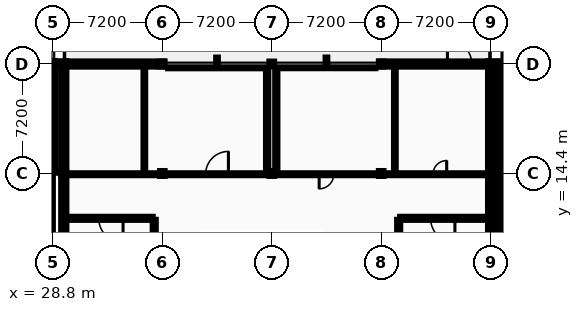
"""IFC4 building model, lengths in metres.
Left out: names, types, materials, properties, quantities, classifications, styles, units other than length and angle.
Written with IfcOpenShell. Run it as: python <this file> out.ifc"""

import sys

from ifc_helpers import new_model, si_unit, direction, frame, frame_2d, origin, origin_2d, place, context, subcontext, project, spatial, rectangle, i_section, extrude, element, fill, save


model = new_model("IFC4")
c1 = context("Model", 3, precision=1e-05, world=origin(), true_north=direction((0.0, 1.0)))
c2 = subcontext(c1, "Body", "Model", "MODEL_VIEW")
j1 = project(units=[si_unit("LENGTHUNIT", "METRE"), si_unit("PLANEANGLEUNIT", "RADIAN")], contexts=[c1])
p1 = place(None, origin())
s1 = spatial("IfcSite", under=j1, at=p1, CompositionType="ELEMENT")
p2 = place(p1, origin())
s2 = spatial("IfcBuilding", under=s1, at=p2, CompositionType="ELEMENT")
p3 = place(p2, frame((0.0, 0.0, 14.0)))
s3 = spatial("IfcBuildingStorey", under=s2, at=p3, CompositionType="ELEMENT", Elevation=14.0)
p4 = place(p3, frame((28.8, 21.6, 0.0), z_axis=(0.0, 0.0, 1.0), x_axis=(1.0, 0.0, 0.0)))
e1 = element("IfcColumn", 1, at=p4, inside=s3, PredefinedType="COLUMN", context=c2, shape_type="SweptSolid", body=[
    extrude(i_section(OverallWidth=0.3, OverallDepth=0.4, WebThickness=0.013, FlangeThickness=0.024, FilletRadius=0.027, at=origin_2d()), origin(), (0.0, 0.0, 1.0), 4.4),
])
for number, where, z_axis, x_axis in (
    (2, (29.52, 14.4, 0.0), (0.0, 0.0, 1.0), (1.0, 0.0, 0.0)),
    (3, (29.52, 21.6, 0.0), (0.0, 0.0, 1.0), (1.0, 0.0, 0.0)),
    (4, (36.0, 14.4, 0.0), (0.0, 0.0, 1.0), (1.0, 0.0, 0.0)),
    (5, (36.0, 21.6, 0.0), (0.0, 0.0, 1.0), (1.0, 0.0, 0.0)),
    (6, (43.2, 14.4, 0.0), (0.0, 0.0, 1.0), (1.0, 0.0, 0.0)),
    (7, (43.2, 21.6, 0.0), (0.0, 0.0, 1.0), (1.0, 0.0, 0.0)),
    (8, (50.4, 14.4, 0.0), (0.0, 0.0, 1.0), (1.0, 0.0, 0.0)),
    (9, (50.4, 21.6, 0.0), (0.0, 0.0, 1.0), (1.0, 0.0, 0.0)),
    (10, (57.6, 14.4, 0.0), (0.0, 0.0, 1.0), (1.0, 0.0, 0.0)),
    (11, (57.6, 21.6, 0.0), (0.0, 0.0, 1.0), (1.0, 0.0, 0.0)),
    (12, (58.32, 14.4, 0.0), (0.0, 0.0, 1.0), (1.0, 0.0, 0.0)),
    (13, (58.32, 21.6, 0.0), (0.0, 0.0, 1.0), (1.0, 0.0, 0.0)),
):
    element("IfcColumn", number, at=place(p3, frame(where, z_axis=z_axis, x_axis=x_axis)), inside=s3, PredefinedType="COLUMN", context=c2, shape_type="SweptSolid", body=[
        extrude(i_section(OverallWidth=0.3, OverallDepth=0.32, WebThickness=0.011, FlangeThickness=0.021, FilletRadius=0.027, at=origin_2d()), origin(), (0.0, 0.0, 1.0), 4.4),
    ])
p5 = place(p3, frame((28.8, 14.45, 0.0), z_axis=(0.0, 0.0, 1.0), x_axis=(0.0, 1.0, 0.0)))
e14 = element("IfcWall", 14, at=p5, inside=s3, PredefinedType="STANDARD", context=c2, shape_type="SweptSolid", body=[
    extrude(rectangle(XDim=7.15, YDim=0.34, at=frame_2d((3.575, 0.0))), origin(), (0.0, 0.0, 1.0), 4.2),
])
p6 = place(p5, frame((1.596, 0.0, 0.95)))
e15 = element("IfcOpeningElement", 15, at=p6, cuts=e14, PredefinedType="OPENING", context=c2, shape_type="SweptSolid", body=[
    extrude(rectangle(XDim=1.098, YDim=1.368, at=frame_2d((0.549, 0.684))), frame((0.0, 0.18, 0.0), z_axis=(0.0, -1.0, 0.0), x_axis=(1.0, 0.0, 0.0)), (0.0, 0.0, 1.0), 0.36),
])
p7 = place(p5, frame((4.456, 0.0, 0.95)))
e16 = element("IfcOpeningElement", 16, at=p7, cuts=e14, PredefinedType="OPENING", context=c2, shape_type="SweptSolid", body=[
    extrude(rectangle(XDim=1.098, YDim=1.368, at=frame_2d((0.549, 0.684))), frame((0.0, 0.18, 0.0), z_axis=(0.0, -1.0, 0.0), x_axis=(1.0, 0.0, 0.0)), (0.0, 0.0, 1.0), 0.36),
])
p8 = place(p3, frame((36.11, 21.6, 0.0), z_axis=(0.0, 0.0, 1.0), x_axis=(-1.0, 0.0, 0.0)))
e17 = element("IfcWall", 17, at=p8, inside=s3, PredefinedType="STANDARD", context=c2, shape_type="SweptSolid", body=[
    extrude(rectangle(XDim=6.42, YDim=0.34, at=frame_2d((3.21, 0.0))), origin(), (0.0, 0.0, 1.0), 3.935),
])
p9 = place(p3, frame((57.43, 21.6, 0.0), z_axis=(0.0, 0.0, 1.0), x_axis=(-1.0, 0.0, 0.0)))
e18 = element("IfcWall", 18, at=p9, inside=s3, PredefinedType="STANDARD", context=c2, shape_type="SweptSolid", body=[
    extrude(rectangle(XDim=7.14, YDim=0.34, at=frame_2d((3.57, 0.0))), origin(), (0.0, 0.0, 1.0), 3.935),
])
p10 = place(p9, frame((1.072, 0.0, 0.0)))
e19 = element("IfcOpeningElement", 19, at=p10, cuts=e18, PredefinedType="OPENING", context=c2, shape_type="SweptSolid", body=[
    extrude(rectangle(XDim=1.6, YDim=2.2, at=frame_2d((0.8, 1.1))), frame((0.0, 0.18, 0.0), z_axis=(0.0, -1.0, 0.0), x_axis=(1.0, 0.0, 0.0)), (0.0, 0.0, 1.0), 0.36),
])
p11 = place(p3, frame((29.52, 14.4, 0.0), z_axis=(0.0, 0.0, 1.0), x_axis=(0.0, -1.0, 0.0)))
e20 = element("IfcWall", 20, at=p11, inside=s3, PredefinedType="STANDARD", context=c2, shape_type="SweptSolid", body=[
    extrude(rectangle(XDim=5.5, YDim=0.34, at=frame_2d((2.75, 0.0))), origin(), (0.0, 0.0, 1.0), 4.2),
])
p12 = place(p3, frame((29.52, 21.77, 0.0), z_axis=(0.0, 0.0, 1.0), x_axis=(0.0, -1.0, 0.0)))
e21 = element("IfcWall", 21, at=p12, inside=s3, PredefinedType="STANDARD", context=c2, shape_type="SweptSolid", body=[
    extrude(rectangle(XDim=7.37, YDim=0.34, at=frame_2d((3.685, 0.0))), origin(), (0.0, 0.0, 1.0), 3.895),
])
p13 = place(p12, frame((1.73, 0.0, 0.95)))
e22 = element("IfcOpeningElement", 22, at=p13, cuts=e21, PredefinedType="OPENING", context=c2, shape_type="SweptSolid", body=[
    extrude(rectangle(XDim=0.962, YDim=1.404, at=frame_2d((0.481, 0.702))), frame((0.0, 0.18, 0.0), z_axis=(0.0, -1.0, 0.0), x_axis=(1.0, 0.0, 0.0)), (0.0, 0.0, 1.0), 0.36),
])
p14 = place(p12, frame((4.678, 0.0, 0.95)))
e23 = element("IfcOpeningElement", 23, at=p14, cuts=e21, PredefinedType="OPENING", context=c2, shape_type="SweptSolid", body=[
    extrude(rectangle(XDim=0.962, YDim=1.404, at=frame_2d((0.481, 0.702))), frame((0.0, 0.18, 0.0), z_axis=(0.0, -1.0, 0.0), x_axis=(1.0, 0.0, 0.0)), (0.0, 0.0, 1.0), 0.36),
])
p15 = place(p3, frame((57.6, 8.9, 0.0), z_axis=(0.0, 0.0, 1.0), x_axis=(0.0, 1.0, 0.0)))
e24 = element("IfcWall", 24, at=p15, inside=s3, PredefinedType="STANDARD", context=c2, shape_type="SweptSolid", body=[
    extrude(rectangle(XDim=5.5, YDim=0.34, at=frame_2d((2.75, 0.0))), origin(), (0.0, 0.0, 1.0), 4.2),
])
p16 = place(p3, frame((57.6, 14.4, 0.0), z_axis=(0.0, 0.0, 1.0), x_axis=(0.0, 1.0, 0.0)))
e25 = element("IfcWall", 25, at=p16, inside=s3, PredefinedType="STANDARD", context=c2, shape_type="SweptSolid", body=[
    extrude(rectangle(XDim=7.37, YDim=0.34, at=frame_2d((3.685, 0.0))), origin(), (0.0, 0.0, 1.0), 3.895),
])
p17 = place(p16, frame((1.679, 0.0, 0.95)))
e26 = element("IfcOpeningElement", 26, at=p17, cuts=e25, PredefinedType="OPENING", context=c2, shape_type="SweptSolid", body=[
    extrude(rectangle(XDim=1.064, YDim=1.404, at=frame_2d((0.532, 0.702))), frame((0.0, 0.18, 0.0), z_axis=(0.0, -1.0, 0.0), x_axis=(1.0, 0.0, 0.0)), (0.0, 0.0, 1.0), 0.36),
])
p18 = place(p16, frame((4.627, 0.0, 0.95)))
e27 = element("IfcOpeningElement", 27, at=p18, cuts=e25, PredefinedType="OPENING", context=c2, shape_type="SweptSolid", body=[
    extrude(rectangle(XDim=1.064, YDim=1.404, at=frame_2d((0.532, 0.702))), frame((0.0, 0.18, 0.0), z_axis=(0.0, -1.0, 0.0), x_axis=(1.0, 0.0, 0.0)), (0.0, 0.0, 1.0), 0.36),
])
p19 = place(p3, frame((58.32, 14.4, 0.0), z_axis=(0.0, 0.0, 1.0), x_axis=(0.0, -1.0, 0.0)))
e28 = element("IfcWall", 28, at=p19, inside=s3, PredefinedType="STANDARD", context=c2, shape_type="SweptSolid", body=[
    extrude(rectangle(XDim=5.5, YDim=0.34, at=frame_2d((2.75, 0.0))), origin(), (0.0, 0.0, 1.0), 4.2),
])
p20 = place(p3, frame((58.32, 21.77, 0.0), z_axis=(0.0, 0.0, 1.0), x_axis=(0.0, -1.0, 0.0)))
e29 = element("IfcWall", 29, at=p20, inside=s3, PredefinedType="STANDARD", context=c2, shape_type="SweptSolid", body=[
    extrude(rectangle(XDim=7.37, YDim=0.34, at=frame_2d((3.685, 0.0))), origin(), (0.0, 0.0, 1.0), 3.895),
])
p21 = place(p20, frame((1.764, 0.0, 0.95)))
e30 = element("IfcOpeningElement", 30, at=p21, cuts=e29, PredefinedType="OPENING", context=c2, shape_type="SweptSolid", body=[
    extrude(rectangle(XDim=0.894, YDim=1.368, at=frame_2d((0.447, 0.684))), frame((0.0, 0.18, 0.0), z_axis=(0.0, -1.0, 0.0), x_axis=(1.0, 0.0, 0.0)), (0.0, 0.0, 1.0), 0.36),
])
p22 = place(p20, frame((4.712, 0.0, 0.95)))
e31 = element("IfcOpeningElement", 31, at=p22, cuts=e29, PredefinedType="OPENING", context=c2, shape_type="SweptSolid", body=[
    extrude(rectangle(XDim=0.894, YDim=1.368, at=frame_2d((0.447, 0.684))), frame((0.0, 0.18, 0.0), z_axis=(0.0, -1.0, 0.0), x_axis=(1.0, 0.0, 0.0)), (0.0, 0.0, 1.0), 0.36),
])
p23 = place(p3, frame((28.6, 5.85, 0.0), z_axis=(0.0, 0.0, 1.0), x_axis=(0.0, 1.0, 0.0)))
e32 = element("IfcWall", 32, at=p23, inside=s3, PredefinedType="SHEAR", context=c2, shape_type="SweptSolid", body=[
    extrude(rectangle(XDim=8.6, YDim=0.4, at=frame_2d((4.3, 0.0))), origin(), (0.0, 0.0, 1.0), 4.2),
])
p24 = place(p3, frame((29.87, 11.45, 0.0), z_axis=(0.0, 0.0, 1.0), x_axis=(1.0, 0.0, 0.0)))
e33 = element("IfcWall", 33, at=p24, inside=s3, PredefinedType="PARTITIONING", context=c2, shape_type="SweptSolid", body=[
    extrude(rectangle(XDim=5.5, YDim=0.2, at=frame_2d((2.75, 0.0))), origin(), (0.0, 0.0, 1.0), 4.2),
])
p25 = place(p24, frame((1.95, 0.0, 0.0)))
e34 = element("IfcOpeningElement", 34, at=p25, cuts=e33, PredefinedType="OPENING", context=c2, shape_type="SweptSolid", body=[
    extrude(rectangle(XDim=1.6, YDim=2.2, at=frame_2d((0.8, 1.1))), frame((0.0, 0.11, 0.0), z_axis=(0.0, -1.0, 0.0), x_axis=(1.0, 0.0, 0.0)), (0.0, 0.0, 1.0), 0.22),
])
p26 = place(p3, frame((35.47, 8.9, 0.0), z_axis=(0.0, 0.0, 1.0), x_axis=(0.0, 1.0, 0.0)))
e35 = element("IfcWall", 35, at=p26, inside=s3, PredefinedType="PARTITIONING", context=c2, shape_type="SweptSolid", body=[
    extrude(rectangle(XDim=2.45, YDim=0.2, at=frame_2d((1.225, 0.0))), origin(), (0.0, 0.0, 1.0), 4.2),
])
p27 = place(p3, frame((51.65, 11.45, 0.0), z_axis=(0.0, 0.0, 1.0), x_axis=(1.0, 0.0, 0.0)))
e36 = element("IfcWall", 36, at=p27, inside=s3, PredefinedType="PARTITIONING", context=c2, shape_type="SweptSolid", body=[
    extrude(rectangle(XDim=5.6, YDim=0.2, at=frame_2d((2.8, 0.0))), origin(), (0.0, 0.0, 1.0), 4.2),
])
p28 = place(p27, frame((2.0, 0.0, 0.0)))
e37 = element("IfcOpeningElement", 37, at=p28, cuts=e36, PredefinedType="OPENING", context=c2, shape_type="SweptSolid", body=[
    extrude(rectangle(XDim=1.6, YDim=2.2, at=frame_2d((0.8, 1.1))), frame((0.0, 0.11, 0.0), z_axis=(0.0, -1.0, 0.0), x_axis=(1.0, 0.0, 0.0)), (0.0, 0.0, 1.0), 0.22),
])
p29 = place(p3, frame((51.55, 8.9, 0.0), z_axis=(0.0, 0.0, 1.0), x_axis=(0.0, 1.0, 0.0)))
e38 = element("IfcWall", 38, at=p29, inside=s3, PredefinedType="PARTITIONING", context=c2, shape_type="SweptSolid", body=[
    extrude(rectangle(XDim=2.45, YDim=0.2, at=frame_2d((1.225, 0.0))), origin(), (0.0, 0.0, 1.0), 4.2),
])
p30 = place(p3, frame((29.9, 14.35, 0.0), z_axis=(0.0, 0.0, 1.0), x_axis=(1.0, 0.0, 0.0)))
e39 = element("IfcWall", 39, at=p30, inside=s3, PredefinedType="PARTITIONING", context=c2, shape_type="SweptSolid", body=[
    extrude(rectangle(XDim=5.72, YDim=0.125, at=frame_2d((2.86, 0.0))), origin(), (0.0, 0.0, 1.0), 3.935),
])
p31 = place(p30, frame((1.96, 0.0, 0.0)))
e40 = element("IfcOpeningElement", 40, at=p31, cuts=e39, PredefinedType="OPENING", context=c2, shape_type="SweptSolid", body=[
    extrude(rectangle(XDim=1.0, YDim=2.1, at=frame_2d((0.5, 1.05))), frame((0.0, 0.073, 0.0), z_axis=(0.0, -1.0, 0.0), x_axis=(1.0, 0.0, 0.0)), (0.0, 0.0, 1.0), 0.145),
])
p32 = place(p3, frame((36.38, 14.35, 0.0), z_axis=(0.0, 0.0, 1.0), x_axis=(1.0, 0.0, 0.0)))
e41 = element("IfcWall", 41, at=p32, inside=s3, PredefinedType="PARTITIONING", context=c2, shape_type="SweptSolid", body=[
    extrude(rectangle(XDim=6.44, YDim=0.125, at=frame_2d((3.22, 0.0))), origin(), (0.0, 0.0, 1.0), 3.935),
])
p33 = place(p32, frame((2.47, 0.0, 0.0)))
e42 = element("IfcOpeningElement", 42, at=p33, cuts=e41, PredefinedType="OPENING", context=c2, shape_type="SweptSolid", body=[
    extrude(rectangle(XDim=1.5, YDim=2.2, at=frame_2d((0.75, 1.1))), frame((0.0, 0.073, 0.0), z_axis=(0.0, -1.0, 0.0), x_axis=(1.0, 0.0, 0.0)), (0.0, 0.0, 1.0), 0.145),
])
p34 = place(p3, frame((43.58, 14.35, 0.0), z_axis=(0.0, 0.0, 1.0), x_axis=(1.0, 0.0, 0.0)))
e43 = element("IfcWall", 43, at=p34, inside=s3, PredefinedType="PARTITIONING", context=c2, shape_type="SweptSolid", body=[
    extrude(rectangle(XDim=6.44, YDim=0.125, at=frame_2d((3.22, 0.0))), origin(), (0.0, 0.0, 1.0), 3.935),
])
p35 = place(p34, frame((2.741, 0.0, 0.0)))
e44 = element("IfcOpeningElement", 44, at=p35, cuts=e43, PredefinedType="OPENING", context=c2, shape_type="SweptSolid", body=[
    extrude(rectangle(XDim=0.958, YDim=2.04, at=frame_2d((0.479, 1.02))), frame((0.0, 0.073, 0.0), z_axis=(0.0, -1.0, 0.0), x_axis=(1.0, 0.0, 0.0)), (0.0, 0.0, 1.0), 0.145),
])
p36 = place(p3, frame((50.78, 14.35, 0.0), z_axis=(0.0, 0.0, 1.0), x_axis=(1.0, 0.0, 0.0)))
e45 = element("IfcWall", 45, at=p36, inside=s3, PredefinedType="PARTITIONING", context=c2, shape_type="SweptSolid", body=[
    extrude(rectangle(XDim=6.44, YDim=0.125, at=frame_2d((3.22, 0.0))), origin(), (0.0, 0.0, 1.0), 3.935),
])
p37 = place(p36, frame((3.03, 0.0, 0.0)))
e46 = element("IfcOpeningElement", 46, at=p37, cuts=e45, PredefinedType="OPENING", context=c2, shape_type="SweptSolid", body=[
    extrude(rectangle(XDim=0.9, YDim=2.1, at=frame_2d((0.45, 1.05))), frame((0.0, 0.073, 0.0), z_axis=(0.0, -1.0, 0.0), x_axis=(1.0, 0.0, 0.0)), (0.0, 0.0, 1.0), 0.145),
])
p38 = place(p3, frame((36.38, 21.4, 0.0), z_axis=(0.0, 0.0, 1.0), x_axis=(1.0, 0.0, 0.0)))
e47 = element("IfcWall", 47, at=p38, inside=s3, PredefinedType="PARTITIONING", context=c2, shape_type="SweptSolid", body=[
    extrude(rectangle(XDim=6.44, YDim=0.16, at=frame_2d((3.22, 0.0))), origin(), (0.0, 0.0, 1.0), 3.935),
])
p39 = place(p3, frame((43.58, 21.4, 0.0), z_axis=(0.0, 0.0, 1.0), x_axis=(1.0, 0.0, 0.0)))
e48 = element("IfcWall", 48, at=p39, inside=s3, PredefinedType="PARTITIONING", context=c2, shape_type="SweptSolid", body=[
    extrude(rectangle(XDim=6.44, YDim=0.15, at=frame_2d((3.22, 0.0))), origin(), (0.0, 0.0, 1.0), 3.935),
])
p40 = place(p3, frame((34.82, 14.413, 0.0), z_axis=(0.0, 0.0, 1.0), x_axis=(0.0, 1.0, 0.0)))
e49 = element("IfcWall", 49, at=p40, inside=s3, PredefinedType="PARTITIONING", context=c2, shape_type="SweptSolid", body=[
    extrude(rectangle(XDim=6.987, YDim=0.11, at=frame_2d((3.494, 0.0))), origin(), (0.0, 0.0, 1.0), 4.2),
])
p41 = place(p3, frame((42.9, 14.78, 0.0), z_axis=(0.0, 0.0, 1.0), x_axis=(0.0, 1.0, 0.0)))
e50 = element("IfcWall", 50, at=p41, inside=s3, PredefinedType="PARTITIONING", context=c2, shape_type="SweptSolid", body=[
    extrude(rectangle(XDim=6.44, YDim=0.15, at=frame_2d((3.22, 0.0))), origin(), (0.0, 0.0, 1.0), 3.895),
])
p42 = place(p3, frame((43.5, 14.78, 0.0), z_axis=(0.0, 0.0, 1.0), x_axis=(0.0, 1.0, 0.0)))
e51 = element("IfcWall", 51, at=p42, inside=s3, PredefinedType="PARTITIONING", context=c2, shape_type="SweptSolid", body=[
    extrude(rectangle(XDim=6.44, YDim=0.142, at=frame_2d((3.22, 0.0))), origin(), (0.0, 0.0, 1.0), 3.895),
])
p43 = place(p3, frame((51.3, 14.413, 0.0), z_axis=(0.0, 0.0, 1.0), x_axis=(0.0, 1.0, 0.0)))
e52 = element("IfcWall", 52, at=p43, inside=s3, PredefinedType="PARTITIONING", context=c2, shape_type="SweptSolid", body=[
    extrude(rectangle(XDim=6.987, YDim=0.11, at=frame_2d((3.494, 0.0))), origin(), (0.0, 0.0, 1.0), 4.2),
])
p44 = place(p6, origin())
e53 = element("IfcWindow", 53, at=p44, inside=s3, PartitioningType="SINGLE_PANEL", PredefinedType="WINDOW", context=c2, shape_type="SweptSolid", body=[
    extrude(rectangle(XDim=1.098, YDim=1.368, at=frame_2d((0.549, 0.684))), frame((0.0, 0.03, 0.0), z_axis=(0.0, -1.0, 0.0), x_axis=(1.0, 0.0, 0.0)), (0.0, 0.0, 1.0), 0.06),
])
fill(e15, e53)
p45 = place(p7, origin())
e54 = element("IfcWindow", 54, at=p45, inside=s3, PartitioningType="SINGLE_PANEL", PredefinedType="WINDOW", context=c2, shape_type="SweptSolid", body=[
    extrude(rectangle(XDim=1.098, YDim=1.368, at=frame_2d((0.549, 0.684))), frame((0.0, 0.03, 0.0), z_axis=(0.0, -1.0, 0.0), x_axis=(1.0, 0.0, 0.0)), (0.0, 0.0, 1.0), 0.06),
])
fill(e16, e54)
p46 = place(p13, origin())
e55 = element("IfcWindow", 55, at=p46, inside=s3, PartitioningType="SINGLE_PANEL", PredefinedType="WINDOW", context=c2, shape_type="SweptSolid", body=[
    extrude(rectangle(XDim=0.962, YDim=1.404, at=frame_2d((0.481, 0.702))), frame((0.0, 0.03, 0.0), z_axis=(0.0, -1.0, 0.0), x_axis=(1.0, 0.0, 0.0)), (0.0, 0.0, 1.0), 0.06),
])
fill(e22, e55)
p47 = place(p14, origin())
e56 = element("IfcWindow", 56, at=p47, inside=s3, PartitioningType="SINGLE_PANEL", PredefinedType="WINDOW", context=c2, shape_type="SweptSolid", body=[
    extrude(rectangle(XDim=0.962, YDim=1.404, at=frame_2d((0.481, 0.702))), frame((0.0, 0.03, 0.0), z_axis=(0.0, -1.0, 0.0), x_axis=(1.0, 0.0, 0.0)), (0.0, 0.0, 1.0), 0.06),
])
fill(e23, e56)
p48 = place(p17, origin())
e57 = element("IfcWindow", 57, at=p48, inside=s3, PartitioningType="SINGLE_PANEL", PredefinedType="WINDOW", context=c2, shape_type="SweptSolid", body=[
    extrude(rectangle(XDim=1.064, YDim=1.404, at=frame_2d((0.532, 0.702))), frame((0.0, 0.03, 0.0), z_axis=(0.0, -1.0, 0.0), x_axis=(1.0, 0.0, 0.0)), (0.0, 0.0, 1.0), 0.06),
])
fill(e26, e57)
p49 = place(p18, origin())
e58 = element("IfcWindow", 58, at=p49, inside=s3, PartitioningType="SINGLE_PANEL", PredefinedType="WINDOW", context=c2, shape_type="SweptSolid", body=[
    extrude(rectangle(XDim=1.064, YDim=1.404, at=frame_2d((0.532, 0.702))), frame((0.0, 0.03, 0.0), z_axis=(0.0, -1.0, 0.0), x_axis=(1.0, 0.0, 0.0)), (0.0, 0.0, 1.0), 0.06),
])
fill(e27, e58)
p50 = place(p21, origin())
e59 = element("IfcWindow", 59, at=p50, inside=s3, PartitioningType="SINGLE_PANEL", PredefinedType="WINDOW", context=c2, shape_type="SweptSolid", body=[
    extrude(rectangle(XDim=0.894, YDim=1.368, at=frame_2d((0.447, 0.684))), frame((0.0, 0.03, 0.0), z_axis=(0.0, -1.0, 0.0), x_axis=(1.0, 0.0, 0.0)), (0.0, 0.0, 1.0), 0.06),
])
fill(e30, e59)
p51 = place(p22, origin())
e60 = element("IfcWindow", 60, at=p51, inside=s3, PartitioningType="SINGLE_PANEL", PredefinedType="WINDOW", context=c2, shape_type="SweptSolid", body=[
    extrude(rectangle(XDim=0.894, YDim=1.368, at=frame_2d((0.447, 0.684))), frame((0.0, 0.03, 0.0), z_axis=(0.0, -1.0, 0.0), x_axis=(1.0, 0.0, 0.0)), (0.0, 0.0, 1.0), 0.06),
])
fill(e31, e60)
p52 = place(p10, origin())
e61 = element("IfcDoor", 61, at=p52, inside=s3, OperationType="DOUBLE_DOOR_SINGLE_SWING", PredefinedType="DOOR", context=c2, shape_type="SweptSolid", body=[
    extrude(rectangle(XDim=1.6, YDim=2.2, at=frame_2d((0.8, 1.1))), frame((0.0, 0.025, 0.0), z_axis=(0.0, -1.0, 0.0), x_axis=(1.0, 0.0, 0.0)), (0.0, 0.0, 1.0), 0.05),
])
fill(e19, e61)
p53 = place(p25, origin())
e62 = element("IfcDoor", 62, at=p53, inside=s3, OperationType="DOUBLE_DOOR_SINGLE_SWING", PredefinedType="DOOR", context=c2, shape_type="SweptSolid", body=[
    extrude(rectangle(XDim=1.6, YDim=2.2, at=frame_2d((0.8, 1.1))), frame((0.0, 0.025, 0.0), z_axis=(0.0, -1.0, 0.0), x_axis=(1.0, 0.0, 0.0)), (0.0, 0.0, 1.0), 0.05),
])
fill(e34, e62)
p54 = place(p28, origin())
e63 = element("IfcDoor", 63, at=p54, inside=s3, OperationType="DOUBLE_DOOR_SINGLE_SWING", PredefinedType="DOOR", context=c2, shape_type="SweptSolid", body=[
    extrude(rectangle(XDim=1.6, YDim=2.2, at=frame_2d((0.8, 1.1))), frame((0.0, 0.025, 0.0), z_axis=(0.0, -1.0, 0.0), x_axis=(1.0, 0.0, 0.0)), (0.0, 0.0, 1.0), 0.05),
])
fill(e37, e63)
p55 = place(p31, frame((1.0, 0.0, 0.0), z_axis=(0.0, 0.0, 1.0), x_axis=(-1.0, 0.0, 0.0)))
e64 = element("IfcDoor", 64, at=p55, inside=s3, OperationType="SLIDING_TO_LEFT", PredefinedType="DOOR", context=c2, shape_type="SweptSolid", body=[
    extrude(rectangle(XDim=1.0, YDim=2.1, at=frame_2d((0.5, 1.05))), frame((0.0, 0.025, 0.0), z_axis=(0.0, -1.0, 0.0), x_axis=(1.0, 0.0, 0.0)), (0.0, 0.0, 1.0), 0.05),
])
fill(e40, e64)
p56 = place(p37, frame((0.9, 0.0, 0.0), z_axis=(0.0, 0.0, 1.0), x_axis=(-1.0, 0.0, 0.0)))
e65 = element("IfcDoor", 65, at=p56, inside=s3, OperationType="SINGLE_SWING_RIGHT", PredefinedType="DOOR", context=c2, shape_type="SweptSolid", body=[
    extrude(rectangle(XDim=0.9, YDim=2.1, at=frame_2d((0.45, 1.05))), frame((0.0, 0.025, 0.0), z_axis=(0.0, -1.0, 0.0), x_axis=(1.0, 0.0, 0.0)), (0.0, 0.0, 1.0), 0.05),
])
fill(e46, e65)
p57 = place(p35, frame((0.958, 0.0, 0.0), z_axis=(0.0, 0.0, 1.0), x_axis=(-1.0, 0.0, 0.0)))
e66 = element("IfcDoor", 66, at=p57, inside=s3, OperationType="SINGLE_SWING_LEFT", PredefinedType="DOOR", context=c2, shape_type="SweptSolid", body=[
    extrude(rectangle(XDim=0.958, YDim=2.04, at=frame_2d((0.479, 1.02))), frame((0.0, 0.025, 0.0), z_axis=(0.0, -1.0, 0.0), x_axis=(1.0, 0.0, 0.0)), (0.0, 0.0, 1.0), 0.05),
])
fill(e44, e66)
p58 = place(p33, frame((1.5, 0.0, 0.0), z_axis=(0.0, 0.0, 1.0), x_axis=(-1.0, 0.0, 0.0)))
e67 = element("IfcDoor", 67, at=p58, inside=s3, OperationType="DOUBLE_DOOR_SINGLE_SWING", PredefinedType="DOOR", context=c2, shape_type="SweptSolid", body=[
    extrude(rectangle(XDim=1.5, YDim=2.2, at=frame_2d((0.75, 1.1))), frame((0.0, 0.025, 0.0), z_axis=(0.0, -1.0, 0.0), x_axis=(1.0, 0.0, 0.0)), (0.0, 0.0, 1.0), 0.05),
])
fill(e42, e67)
save(model, sys.argv[1])
